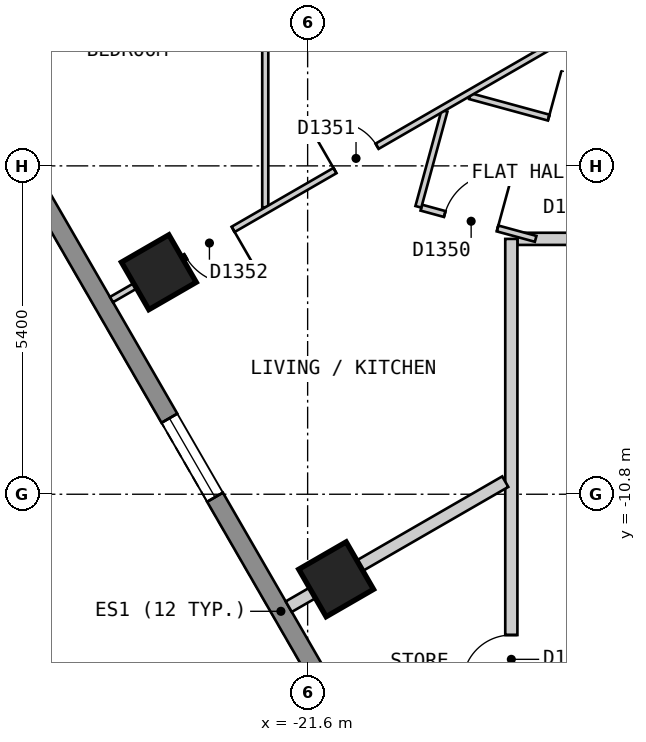
"""IFC4 building model, lengths in metres.
Left out: names, types, materials, properties, quantities, classifications, styles, units other than length and angle.
Written with IfcOpenShell. Run it as: python <this file> out.ifc"""

import sys

from ifc_helpers import new_model, si_unit, direction, frame, frame_2d, origin, origin_2d, place, context, subcontext, project, spatial, polyline, rectangle, outline, extrude, element, fill, save


model = new_model("IFC4")
c1 = context("Model", 3, precision=1e-05, world=origin(), true_north=direction((0.0, 1.0)))
c2 = subcontext(c1, "Body", "Model", "MODEL_VIEW")
j1 = project(units=[si_unit("LENGTHUNIT", "METRE"), si_unit("PLANEANGLEUNIT", "RADIAN")], contexts=[c1])
p1 = place(None, origin())
s1 = spatial("IfcSite", under=j1, at=p1, CompositionType="ELEMENT")
p2 = place(p1, origin())
s2 = spatial("IfcBuilding", under=s1, at=p2, CompositionType="ELEMENT")
p3 = place(p2, frame((0.0, 0.0, 147.6)))
s3 = spatial("IfcBuildingStorey", under=s2, at=p3, CompositionType="ELEMENT", Elevation=147.6)
for number, where, z_axis, x_axis in (
    (1, (-24.047, -7.149, 0.0), (0.0, 0.0, 1.0), (0.5, -0.866, 0.0)),
    (2, (-21.131, -12.199, 0.0), (0.0, 0.0, 1.0), (0.5, -0.866, 0.0)),
):
    element("IfcColumn", number, at=place(p3, frame(where, z_axis=z_axis, x_axis=x_axis)), inside=s3, PredefinedType="COLUMN", context=c2, shape_type="SweptSolid", body=[
        extrude(rectangle(XDim=0.9, YDim=0.9, at=origin_2d()), origin(), (0.0, 0.0, 1.0), 3.0),
    ])
p4 = place(p3, frame((-28.218, -2.025, 0.0), z_axis=(0.0, 0.0, 1.0), x_axis=(0.500017503135, -0.866015298109, 0.0)))
e3 = element("IfcWall", 3, at=p4, inside=s3, PredefinedType="SOLIDWALL", context=c2, shape_type="SweptSolid", body=[
    extrude(outline(polyline([(0.0, -0.15), (24.711, -0.15), (24.631, 0.15), (0.08, 0.15), (0.0, -0.15)])), origin(), (0.0, 0.0, 1.0), 2.7),
])
p5 = place(p4, frame((2.857, 0.0, 0.15)))
e4 = element("IfcOpeningElement", 4, at=p5, cuts=e3, PredefinedType="OPENING", context=c2, shape_type="SweptSolid", body=[
    extrude(rectangle(XDim=1.5, YDim=2.1, at=frame_2d((0.75, 1.05))), frame((0.0, 0.16, 0.0), z_axis=(0.0, -1.0, 0.0), x_axis=(1.0, 0.0, 0.0)), (0.0, 0.0, 1.0), 0.32),
])
p6 = place(p4, frame((8.689, 0.0, 0.15)))
e5 = element("IfcOpeningElement", 5, at=p6, cuts=e3, PredefinedType="OPENING", context=c2, shape_type="SweptSolid", body=[
    extrude(rectangle(XDim=1.5, YDim=2.1, at=frame_2d((0.75, 1.05))), frame((0.0, 0.16, 0.0), z_axis=(0.0, -1.0, 0.0), x_axis=(1.0, 0.0, 0.0)), (0.0, 0.0, 1.0), 0.32),
])
p7 = place(p4, frame((14.52, 0.0, 0.15)))
e6 = element("IfcOpeningElement", 6, at=p7, cuts=e3, PredefinedType="OPENING", context=c2, shape_type="SweptSolid", body=[
    extrude(rectangle(XDim=1.5, YDim=2.1, at=frame_2d((0.75, 1.05))), frame((0.0, 0.16, 0.0), z_axis=(0.0, -1.0, 0.0), x_axis=(1.0, 0.0, 0.0)), (0.0, 0.0, 1.0), 0.32),
])
p8 = place(p4, frame((20.351, 0.0, 0.15)))
e7 = element("IfcOpeningElement", 7, at=p8, cuts=e3, PredefinedType="OPENING", context=c2, shape_type="SweptSolid", body=[
    extrude(rectangle(XDim=1.5, YDim=2.1, at=frame_2d((0.75, 1.05))), frame((0.0, 0.16, 0.0), z_axis=(0.0, -1.0, 0.0), x_axis=(1.0, 0.0, 0.0)), (0.0, 0.0, 1.0), 0.32),
])
p9 = place(p3, frame((-18.149, -6.6, 0.0), z_axis=(0.0, 0.0, 1.0), x_axis=(1.0, 0.0, 0.0)))
e8 = element("IfcWall", 8, at=p9, inside=s3, PredefinedType="PARTITIONING", context=c2, shape_type="SweptSolid", body=[
    extrude(rectangle(XDim=2.549, YDim=0.2, at=frame_2d((1.274, 0.0))), origin(), (0.0, 0.0, 1.0), 2.7),
])
p10 = place(p9, frame((0.834, 0.0, 0.0)))
e9 = element("IfcOpeningElement", 9, at=p10, cuts=e8, PredefinedType="OPENING", context=c2, shape_type="SweptSolid", body=[
    extrude(rectangle(XDim=1.0, YDim=2.1, at=frame_2d((0.5, 1.05))), frame((0.0, 0.11, 0.0), z_axis=(0.0, -1.0, 0.0), x_axis=(1.0, 0.0, 0.0)), (0.0, 0.0, 1.0), 0.22),
])
p11 = place(p3, frame((-18.25, -16.4, 0.0), z_axis=(0.0, 0.0, 1.0), x_axis=(0.0, 1.0, 0.0)))
e10 = element("IfcWall", 10, at=p11, inside=s3, PredefinedType="PARTITIONING", context=c2, shape_type="SweptSolid", body=[
    extrude(rectangle(XDim=9.799, YDim=0.2, at=frame_2d((4.899, 0.0))), origin(), (0.0, 0.0, 1.0), 2.7),
])
p12 = place(p11, frame((2.485, 0.0, 0.0)))
e11 = element("IfcOpeningElement", 11, at=p12, cuts=e10, PredefinedType="OPENING", context=c2, shape_type="SweptSolid", body=[
    extrude(rectangle(XDim=0.8, YDim=2.1, at=frame_2d((0.4, 1.05))), frame((0.0, 0.11, 0.0), z_axis=(0.0, -1.0, 0.0), x_axis=(1.0, 0.0, 0.0)), (0.0, 0.0, 1.0), 0.22),
])
p13 = place(p3, frame((-18.931, -4.253, 0.0), z_axis=(0.0, 0.0, 1.0), x_axis=(0.96479645258, -0.262997728296, 0.0)))
e12 = element("IfcWall", 12, at=p13, inside=s3, PredefinedType="PARTITIONING", context=c2, shape_type="SweptSolid", body=[
    extrude(rectangle(XDim=3.452, YDim=0.1, at=frame_2d((1.726, 0.0))), origin(), (0.0, 0.0, 1.0), 2.7),
])
p14 = place(p13, frame((1.343, 0.0, 0.0)))
e13 = element("IfcOpeningElement", 13, at=p14, cuts=e12, PredefinedType="OPENING", context=c2, shape_type="SweptSolid", body=[
    extrude(rectangle(XDim=0.8, YDim=2.1, at=frame_2d((0.4, 1.05))), frame((0.0, 0.06, 0.0), z_axis=(0.0, -1.0, 0.0), x_axis=(1.0, 0.0, 0.0)), (0.0, 0.0, 1.0), 0.12),
])
p15 = place(p3, frame((-19.73, -6.087, 0.0), z_axis=(0.0, 0.0, 1.0), x_axis=(0.964700186442, -0.263350622325, 0.0)))
e14 = element("IfcWall", 14, at=p15, inside=s3, PredefinedType="PARTITIONING", context=c2, shape_type="SweptSolid", body=[
    extrude(rectangle(XDim=1.949, YDim=0.1, at=frame_2d((0.974, 0.0))), origin(), (0.0, 0.0, 1.0), 2.7),
])
p16 = place(p15, frame((0.399, 0.0, 0.0)))
e15 = element("IfcOpeningElement", 15, at=p16, cuts=e14, PredefinedType="OPENING", context=c2, shape_type="SweptSolid", body=[
    extrude(rectangle(XDim=0.9, YDim=2.1, at=frame_2d((0.45, 1.05))), frame((0.0, 0.06, 0.0), z_axis=(0.0, -1.0, 0.0), x_axis=(1.0, 0.0, 0.0)), (0.0, 0.0, 1.0), 0.12),
])
p17 = place(p3, frame((-19.779, -6.073, 0.0), z_axis=(0.0, 0.0, 1.0), x_axis=(0.262700832967, 0.964877335395, 0.0)))
e16 = element("IfcWall", 16, at=p17, inside=s3, PredefinedType="PARTITIONING", context=c2, shape_type="SweptSolid", body=[
    extrude(rectangle(XDim=1.636, YDim=0.1, at=frame_2d((0.818, 0.0))), origin(), (0.0, 0.0, 1.0), 2.7),
])
p18 = place(p3, frame((-22.297, -6.081, 0.0), z_axis=(0.0, 0.0, 1.0), x_axis=(0.0, 1.0, 0.0)))
e17 = element("IfcWall", 17, at=p18, inside=s3, PredefinedType="PARTITIONING", context=c2, shape_type="SweptSolid", body=[
    extrude(rectangle(XDim=3.527, YDim=0.1, at=frame_2d((1.764, 0.0))), origin(), (0.0, 0.0, 1.0), 2.7),
])
p19 = place(p3, frame((-24.826, -7.599, 0.0), z_axis=(0.0, 0.0, 1.0), x_axis=(0.866020686789, 0.500008169986, 0.0)))
e18 = element("IfcWall", 18, at=p19, inside=s3, PredefinedType="PARTITIONING", context=c2, shape_type="SweptSolid", body=[
    extrude(rectangle(XDim=10.01, YDim=0.1, at=frame_2d((5.005, 0.0))), origin(), (0.0, 0.0, 1.0), 2.7),
])
p20 = place(p19, frame((4.244, 0.0, 0.0)))
e19 = element("IfcOpeningElement", 19, at=p20, cuts=e18, PredefinedType="OPENING", context=c2, shape_type="SweptSolid", body=[
    extrude(rectangle(XDim=0.8, YDim=2.1, at=frame_2d((0.4, 1.05))), frame((0.0, 0.06, 0.0), z_axis=(0.0, -1.0, 0.0), x_axis=(1.0, 0.0, 0.0)), (0.0, 0.0, 1.0), 0.12),
])
p21 = place(p19, frame((1.41, 0.0, 0.0)))
e20 = element("IfcOpeningElement", 20, at=p21, cuts=e18, PredefinedType="OPENING", context=c2, shape_type="SweptSolid", body=[
    extrude(rectangle(XDim=0.9, YDim=2.1, at=frame_2d((0.45, 1.05))), frame((0.0, 0.06, 0.0), z_axis=(0.0, -1.0, 0.0), x_axis=(1.0, 0.0, 0.0)), (0.0, 0.0, 1.0), 0.12),
])
p22 = place(p3, frame((-21.911, -12.649, 0.0), z_axis=(0.0, 0.0, 1.0), x_axis=(0.866016499285, 0.500015422728, 0.0)))
e21 = element("IfcWall", 21, at=p22, inside=s3, PredefinedType="PARTITIONING", context=c2, shape_type="SweptSolid", body=[
    extrude(rectangle(XDim=4.112, YDim=0.2, at=frame_2d((2.056, 0.0))), origin(), (0.0, 0.0, 1.0), 2.7),
])
p23 = place(p6, origin())
e22 = element("IfcWindow", 22, at=p23, inside=s3, PartitioningType="SINGLE_PANEL", PredefinedType="WINDOW", context=c2, shape_type="SweptSolid", body=[
    extrude(rectangle(XDim=1.5, YDim=2.1, at=frame_2d((0.75, 1.05))), frame((0.0, 0.03, 0.0), z_axis=(0.0, -1.0, 0.0), x_axis=(1.0, 0.0, 0.0)), (0.0, 0.0, 1.0), 0.06),
])
fill(e5, e22)
p24 = place(p14, origin())
e23 = element("IfcDoor", 23, at=p24, inside=s3, OperationType="SINGLE_SWING_LEFT", PredefinedType="DOOR", context=c2, shape_type="SweptSolid", body=[
    extrude(rectangle(XDim=0.8, YDim=2.1, at=frame_2d((0.4, 1.05))), frame((0.0, 0.025, 0.0), z_axis=(0.0, -1.0, 0.0), x_axis=(1.0, 0.0, 0.0)), (0.0, 0.0, 1.0), 0.05),
])
fill(e13, e23)
p25 = place(p16, origin())
e24 = element("IfcDoor", 24, at=p25, inside=s3, OperationType="SINGLE_SWING_RIGHT", PredefinedType="DOOR", context=c2, shape_type="SweptSolid", body=[
    extrude(rectangle(XDim=0.9, YDim=2.1, at=frame_2d((0.45, 1.05))), frame((0.0, 0.025, 0.0), z_axis=(0.0, -1.0, 0.0), x_axis=(1.0, 0.0, 0.0)), (0.0, 0.0, 1.0), 0.05),
])
fill(e15, e24)
p26 = place(p20, origin())
e25 = element("IfcDoor", 25, at=p26, inside=s3, OperationType="SINGLE_SWING_LEFT", PredefinedType="DOOR", context=c2, shape_type="SweptSolid", body=[
    extrude(rectangle(XDim=0.8, YDim=2.1, at=frame_2d((0.4, 1.05))), frame((0.0, 0.025, 0.0), z_axis=(0.0, -1.0, 0.0), x_axis=(1.0, 0.0, 0.0)), (0.0, 0.0, 1.0), 0.05),
])
fill(e19, e25)
p27 = place(p21, origin())
e26 = element("IfcDoor", 26, at=p27, inside=s3, OperationType="SINGLE_SWING_RIGHT", PredefinedType="DOOR", context=c2, shape_type="SweptSolid", body=[
    extrude(rectangle(XDim=0.9, YDim=2.1, at=frame_2d((0.45, 1.05))), frame((0.0, 0.025, 0.0), z_axis=(0.0, -1.0, 0.0), x_axis=(1.0, 0.0, 0.0)), (0.0, 0.0, 1.0), 0.05),
])
fill(e20, e26)
p28 = place(p12, origin())
e27 = element("IfcDoor", 27, at=p28, inside=s3, OperationType="SINGLE_SWING_LEFT", PredefinedType="DOOR", context=c2, shape_type="SweptSolid", body=[
    extrude(rectangle(XDim=0.8, YDim=2.1, at=frame_2d((0.4, 1.05))), frame((0.0, 0.025, 0.0), z_axis=(0.0, -1.0, 0.0), x_axis=(1.0, 0.0, 0.0)), (0.0, 0.0, 1.0), 0.05),
])
fill(e11, e27)
save(model, sys.argv[1])
